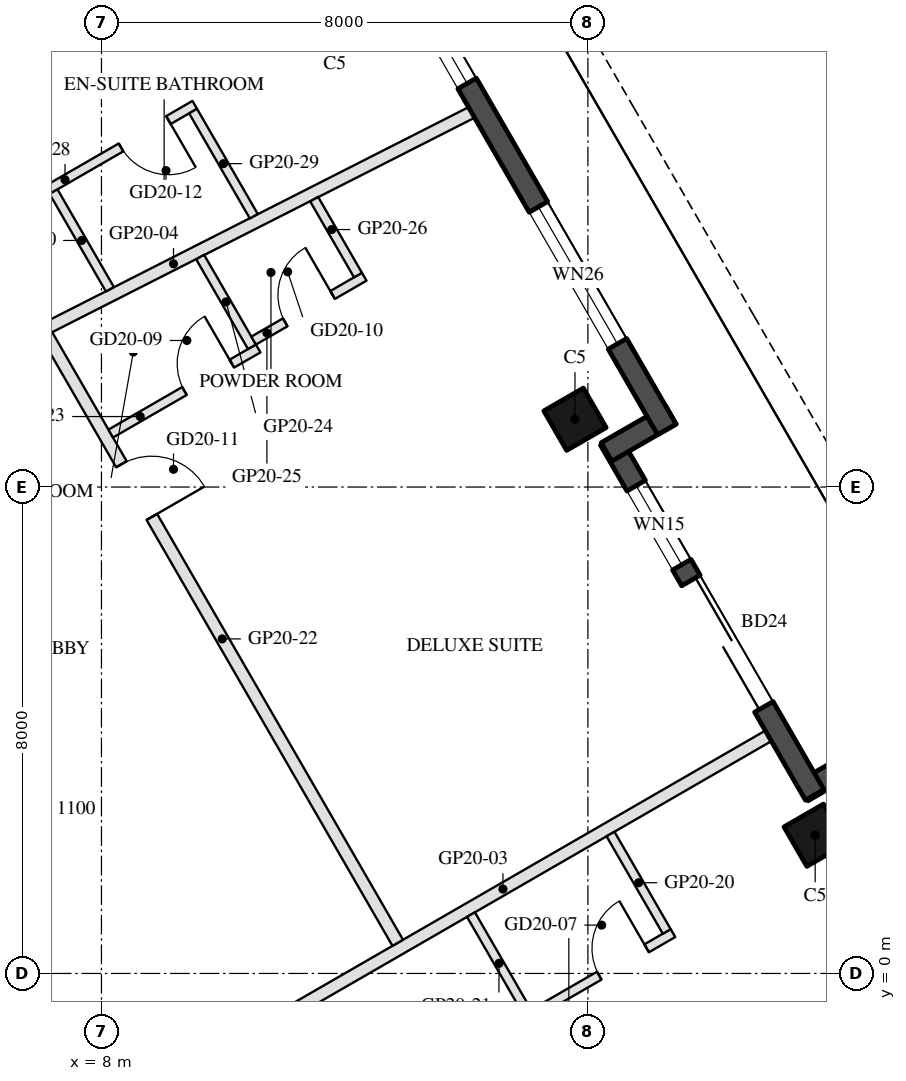
"""IFC4 building model, lengths in metres.
Left out: names, types, materials, properties, quantities, classifications, styles, units other than length and angle.
Written with IfcOpenShell. Run it as: python <this file> out.ifc"""

import sys

from ifc_helpers import new_model, si_unit, direction, frame, frame_2d, origin, origin_2d, place, context, subcontext, project, spatial, rectangle, hollow_rectangle, extrude, element, fill, save


model = new_model("IFC4")
c1 = context("Model", 3, precision=1e-05, world=origin(), true_north=direction((0.0, 1.0)))
c2 = subcontext(c1, "Body", "Model", "MODEL_VIEW")
j1 = project(units=[si_unit("LENGTHUNIT", "METRE"), si_unit("PLANEANGLEUNIT", "RADIAN")], contexts=[c1])
p1 = place(None, origin())
s1 = spatial("IfcSite", under=j1, at=p1, CompositionType="ELEMENT")
p2 = place(p1, origin())
s2 = spatial("IfcBuilding", under=s1, at=p2, CompositionType="ELEMENT")
p3 = place(p2, frame((0.0, 0.0, 213.2)))
s3 = spatial("IfcBuildingStorey", under=s2, at=p3, CompositionType="ELEMENT", Elevation=213.2)
for number, where, z_axis, x_axis in (
    (1, (19.738, 2.273, 0.0), (0.0, 0.0, 1.0), (-0.5, 0.866, 0.0)),
    (2, (15.788, 9.115, 0.0), (0.0, 0.0, 1.0), (-0.5, 0.866, 0.0)),
):
    element("IfcColumn", number, at=place(p3, frame(where, z_axis=z_axis, x_axis=x_axis)), inside=s3, PredefinedType="COLUMN", context=c2, shape_type="SweptSolid", body=[
        extrude(hollow_rectangle(XDim=0.75, YDim=0.75, WallThickness=0.035, at=origin_2d()), origin(), (0.0, 0.0, 1.0), 3.7),
    ])
p4 = place(p3, frame((20.588, 3.601, 0.0), z_axis=(0.0, 0.0, 1.0), x_axis=(-0.866005645448, -0.500034220881, 0.0)))
e3 = element("IfcWall", 3, at=p4, inside=s3, PredefinedType="SOLIDWALL", context=c2, shape_type="SweptSolid", body=[
    extrude(rectangle(XDim=1.22, YDim=0.35, at=frame_2d((0.61, 0.0))), origin(), (0.0, 0.0, 1.0), 3.55),
])
p5 = place(p3, frame((19.729, 2.938, 0.0), z_axis=(0.0, 0.0, 1.0), x_axis=(-0.499976430342, 0.866039011305, 0.0)))
e4 = element("IfcWall", 4, at=p5, inside=s3, PredefinedType="SOLIDWALL", context=c2, shape_type="SweptSolid", body=[
    extrude(rectangle(XDim=6.74, YDim=0.35, at=frame_2d((3.37, 0.0))), origin(), (0.0, 0.0, 1.0), 3.55),
])
p6 = place(p5, frame((1.67, 0.0, 0.0)))
e5 = element("IfcOpeningElement", 5, at=p6, cuts=e4, PredefinedType="OPENING", context=c2, shape_type="SweptSolid", body=[
    extrude(rectangle(XDim=2.4, YDim=2.4, at=frame_2d((1.2, 1.2))), frame((0.0, 0.185, 0.0), z_axis=(0.0, -1.0, 0.0), x_axis=(1.0, 0.0, 0.0)), (0.0, 0.0, 1.0), 0.37),
])
p7 = place(p5, frame((4.37, 0.0, 0.3)))
e6 = element("IfcOpeningElement", 6, at=p7, cuts=e4, PredefinedType="OPENING", context=c2, shape_type="SweptSolid", body=[
    extrude(rectangle(XDim=1.5, YDim=2.65, at=frame_2d((0.75, 1.325))), frame((0.0, 0.185, 0.0), z_axis=(0.0, -1.0, 0.0), x_axis=(1.0, 0.0, 0.0)), (0.0, 0.0, 1.0), 0.37),
])
p8 = place(p3, frame((16.306, 8.577, 0.0), z_axis=(0.0, 0.0, 1.0), x_axis=(0.866092288191, 0.499884134912, 0.0)))
e7 = element("IfcWall", 7, at=p8, inside=s3, PredefinedType="SOLIDWALL", context=c2, shape_type="SweptSolid", body=[
    extrude(rectangle(XDim=1.22, YDim=0.35, at=frame_2d((0.61, 0.0))), origin(), (0.0, 0.0, 1.0), 3.55),
])
p9 = place(p3, frame((17.299, 8.948, 0.0), z_axis=(0.0, 0.0, 1.0), x_axis=(-0.500010041276, 0.866019606374, 0.0)))
e8 = element("IfcWall", 8, at=p9, inside=s3, PredefinedType="SOLIDWALL", context=c2, shape_type="SweptSolid", body=[
    extrude(rectangle(XDim=9.7, YDim=0.35, at=frame_2d((4.85, 0.0))), origin(), (0.0, 0.0, 1.0), 3.55),
])
p10 = place(p9, frame((1.625, 0.0, 0.3)))
e9 = element("IfcOpeningElement", 9, at=p10, cuts=e8, PredefinedType="OPENING", context=c2, shape_type="SweptSolid", body=[
    extrude(rectangle(XDim=2.6, YDim=2.65, at=frame_2d((1.3, 1.325))), frame((0.0, 0.185, 0.0), z_axis=(0.0, -1.0, 0.0), x_axis=(1.0, 0.0, 0.0)), (0.0, 0.0, 1.0), 0.37),
])
p11 = place(p9, frame((6.57, 0.0, 0.3)))
e10 = element("IfcOpeningElement", 10, at=p11, cuts=e8, PredefinedType="OPENING", context=c2, shape_type="SweptSolid", body=[
    extrude(rectangle(XDim=1.5, YDim=2.65, at=frame_2d((0.75, 1.325))), frame((0.0, 0.185, 0.0), z_axis=(0.0, -1.0, 0.0), x_axis=(1.0, 0.0, 0.0)), (0.0, 0.0, 1.0), 0.37),
])
p12 = place(p3, frame((18.968, 3.907, 0.0), z_axis=(0.0, 0.0, 1.0), x_axis=(-0.866022637375, -0.500004791531, 0.0)))
e11 = element("IfcWall", 11, at=p12, inside=s3, PredefinedType="PARTITIONING", context=c2, shape_type="SweptSolid", body=[
    extrude(rectangle(XDim=10.08, YDim=0.2, at=frame_2d((5.04, 0.0))), origin(), (0.0, 0.0, 1.0), 3.06),
])
p13 = place(p3, frame((14.087, 14.161, 0.0), z_axis=(0.0, 0.0, 1.0), x_axis=(-0.891639053189, -0.452746947895, 0.0)))
e12 = element("IfcWall", 12, at=p13, inside=s3, PredefinedType="PARTITIONING", context=c2, shape_type="SweptSolid", body=[
    extrude(rectangle(XDim=10.996, YDim=0.2, at=frame_2d((5.498, 0.0))), origin(), (0.0, 0.0, 1.0), 3.06),
])
p14 = place(p3, frame((14.974, -0.737, 0.0), z_axis=(0.0, 0.0, 1.0), x_axis=(0.866018616679, 0.500011755427, 0.0)))
e13 = element("IfcWall", 13, at=p14, inside=s3, PredefinedType="PARTITIONING", context=c2, shape_type="SweptSolid", body=[
    extrude(rectangle(XDim=2.8, YDim=0.15, at=frame_2d((1.4, 0.0))), origin(), (0.0, 0.0, 1.0), 3.55),
])
p15 = place(p14, frame((1.4, 0.0, 0.0)))
e14 = element("IfcOpeningElement", 14, at=p15, cuts=e13, PredefinedType="OPENING", context=c2, shape_type="SweptSolid", body=[
    extrude(rectangle(XDim=0.9, YDim=2.1, at=frame_2d((0.45, 1.05))), frame((0.0, 0.085, 0.0), z_axis=(0.0, -1.0, 0.0), x_axis=(1.0, 0.0, 0.0)), (0.0, 0.0, 1.0), 0.17),
])
p16 = place(p3, frame((17.297, 0.691, 0.0), z_axis=(0.0, 0.0, 1.0), x_axis=(-0.499985172903, 0.866033964044, 0.0)))
e15 = element("IfcWall", 15, at=p16, inside=s3, PredefinedType="PARTITIONING", context=c2, shape_type="SweptSolid", body=[
    extrude(rectangle(XDim=1.85, YDim=0.15, at=frame_2d((0.925, 0.0))), origin(), (0.0, 0.0, 1.0), 2.95),
])
p17 = place(p3, frame((15.002, -0.634, 0.0), z_axis=(0.0, 0.0, 1.0), x_axis=(-0.500042316284, 0.866000971088, 0.0)))
e16 = element("IfcWall", 16, at=p17, inside=s3, PredefinedType="PARTITIONING", context=c2, shape_type="SweptSolid", body=[
    extrude(rectangle(XDim=1.85, YDim=0.15, at=frame_2d((0.925, 0.0))), origin(), (0.0, 0.0, 1.0), 2.95),
])
p18 = place(p3, frame((7.101, 10.501, 0.0), z_axis=(0.0, 0.0, 1.0), x_axis=(0.500001329633, -0.866024636119, 0.0)))
e17 = element("IfcWall", 17, at=p18, inside=s3, PredefinedType="PARTITIONING", context=c2, shape_type="SweptSolid", body=[
    extrude(rectangle(XDim=11.544, YDim=0.2, at=frame_2d((5.772, 0.0))), origin(), (0.0, 0.0, 1.0), 2.95),
])
p19 = place(p18, frame((2.455, 0.0, 0.0)))
e18 = element("IfcOpeningElement", 18, at=p19, cuts=e17, PredefinedType="OPENING", context=c2, shape_type="SweptSolid", body=[
    extrude(rectangle(XDim=1.0, YDim=2.1, at=frame_2d((0.5, 1.05))), frame((0.0, 0.11, 0.0), z_axis=(0.0, -1.0, 0.0), x_axis=(1.0, 0.0, 0.0)), (0.0, 0.0, 1.0), 0.22),
])
p20 = place(p3, frame((8.153, 8.879, 0.0), z_axis=(0.0, 0.0, 1.0), x_axis=(0.866034573852, 0.49998411664, 0.0)))
e19 = element("IfcWall", 19, at=p20, inside=s3, PredefinedType="PARTITIONING", context=c2, shape_type="SweptSolid", body=[
    extrude(rectangle(XDim=2.8, YDim=0.15, at=frame_2d((1.4, 0.0))), origin(), (0.0, 0.0, 1.0), 3.55),
])
p21 = place(p20, frame((1.4, 0.0, 0.0)))
e20 = element("IfcOpeningElement", 20, at=p21, cuts=e19, PredefinedType="OPENING", context=c2, shape_type="SweptSolid", body=[
    extrude(rectangle(XDim=0.9, YDim=2.1, at=frame_2d((0.45, 1.05))), frame((0.0, 0.085, 0.0), z_axis=(0.0, -1.0, 0.0), x_axis=(1.0, 0.0, 0.0)), (0.0, 0.0, 1.0), 0.17),
])
p22 = place(p3, frame((10.475, 10.307, 0.0), z_axis=(0.0, 0.0, 1.0), x_axis=(-0.500069835465, 0.865985080505, 0.0)))
e21 = element("IfcWall", 21, at=p22, inside=s3, PredefinedType="PARTITIONING", context=c2, shape_type="SweptSolid", body=[
    extrude(rectangle(XDim=1.703, YDim=0.15, at=frame_2d((0.852, 0.0))), origin(), (0.0, 0.0, 1.0), 2.95),
])
p23 = place(p3, frame((10.503, 10.409, 0.0), z_axis=(0.0, 0.0, 1.0), x_axis=(0.866009402589, 0.500027713859, 0.0)))
e22 = element("IfcWall", 22, at=p23, inside=s3, PredefinedType="PARTITIONING", context=c2, shape_type="SweptSolid", body=[
    extrude(rectangle(XDim=2.1, YDim=0.15, at=frame_2d((1.05, 0.0))), origin(), (0.0, 0.0, 1.0), 3.55),
])
p24 = place(p23, frame((0.6, 0.0, 0.0)))
e23 = element("IfcOpeningElement", 23, at=p24, cuts=e22, PredefinedType="OPENING", context=c2, shape_type="SweptSolid", body=[
    extrude(rectangle(XDim=0.9, YDim=2.1, at=frame_2d((0.45, 1.05))), frame((0.0, 0.085, 0.0), z_axis=(0.0, -1.0, 0.0), x_axis=(1.0, 0.0, 0.0)), (0.0, 0.0, 1.0), 0.17),
])
p25 = place(p3, frame((12.219, 11.486, 0.0), z_axis=(0.0, 0.0, 1.0), x_axis=(-0.500074377092, 0.865982457891, 0.0)))
e24 = element("IfcWall", 24, at=p25, inside=s3, PredefinedType="PARTITIONING", context=c2, shape_type="SweptSolid", body=[
    extrude(rectangle(XDim=1.441, YDim=0.15, at=frame_2d((0.721, 0.0))), origin(), (0.0, 0.0, 1.0), 2.95),
])
p26 = place(p3, frame((9.534, 14.286, 0.0), z_axis=(0.0, 0.0, 1.0), x_axis=(-0.866034573852, -0.49998411664, 0.0)))
e25 = element("IfcWall", 25, at=p26, inside=s3, PredefinedType="PARTITIONING", context=c2, shape_type="SweptSolid", body=[
    extrude(rectangle(XDim=2.8, YDim=0.15, at=frame_2d((1.4, 0.0))), origin(), (0.0, 0.0, 1.0), 3.55),
])
p27 = place(p26, frame((0.5, 0.0, 0.0)))
e26 = element("IfcOpeningElement", 26, at=p27, cuts=e25, PredefinedType="OPENING", context=c2, shape_type="SweptSolid", body=[
    extrude(rectangle(XDim=0.9, YDim=2.1, at=frame_2d((0.45, 1.05))), frame((0.0, 0.085, 0.0), z_axis=(0.0, -1.0, 0.0), x_axis=(1.0, 0.0, 0.0)), (0.0, 0.0, 1.0), 0.17),
])
p28 = place(p3, frame((10.505, 12.454, 0.0), z_axis=(0.0, 0.0, 1.0), x_axis=(-0.499965889992, 0.866045096311, 0.0)))
e27 = element("IfcWall", 27, at=p28, inside=s3, PredefinedType="PARTITIONING", context=c2, shape_type="SweptSolid", body=[
    extrude(rectangle(XDim=1.997, YDim=0.15, at=frame_2d((0.999, 0.0))), origin(), (0.0, 0.0, 1.0), 3.55),
])
p29 = place(p3, frame((8.139, 11.253, 0.0), z_axis=(0.0, 0.0, 1.0), x_axis=(-0.4999770169, 0.866038672677, 0.0)))
e28 = element("IfcWall", 28, at=p29, inside=s3, PredefinedType="PARTITIONING", context=c2, shape_type="SweptSolid", body=[
    extrude(rectangle(XDim=1.854, YDim=0.15, at=frame_2d((0.927, 0.0))), origin(), (0.0, 0.0, 1.0), 3.55),
])
p30 = place(p6, frame((2.4, 0.0, 0.0), z_axis=(0.0, 0.0, 1.0), x_axis=(-1.0, 0.0, 0.0)))
e29 = element("IfcDoor", 29, at=p30, inside=s3, OperationType="SLIDING_TO_LEFT", PredefinedType="DOOR", context=c2, shape_type="SweptSolid", body=[
    extrude(rectangle(XDim=2.4, YDim=2.4, at=frame_2d((1.2, 1.2))), frame((0.0, 0.025, 0.0), z_axis=(0.0, -1.0, 0.0), x_axis=(1.0, 0.0, 0.0)), (0.0, 0.0, 1.0), 0.05),
])
fill(e5, e29)
p31 = place(p7, origin())
e30 = element("IfcWindow", 30, at=p31, inside=s3, PartitioningType="SINGLE_PANEL", PredefinedType="WINDOW", context=c2, shape_type="SweptSolid", body=[
    extrude(rectangle(XDim=1.5, YDim=2.65, at=frame_2d((0.75, 1.325))), frame((0.0, 0.03, 0.0), z_axis=(0.0, -1.0, 0.0), x_axis=(1.0, 0.0, 0.0)), (0.0, 0.0, 1.0), 0.06),
])
fill(e6, e30)
p32 = place(p10, origin())
e31 = element("IfcWindow", 31, at=p32, inside=s3, PartitioningType="SINGLE_PANEL", PredefinedType="WINDOW", context=c2, shape_type="SweptSolid", body=[
    extrude(rectangle(XDim=2.6, YDim=2.65, at=frame_2d((1.3, 1.325))), frame((0.0, 0.03, 0.0), z_axis=(0.0, -1.0, 0.0), x_axis=(1.0, 0.0, 0.0)), (0.0, 0.0, 1.0), 0.06),
])
fill(e9, e31)
p33 = place(p11, origin())
e32 = element("IfcWindow", 32, at=p33, inside=s3, PartitioningType="SINGLE_PANEL", PredefinedType="WINDOW", context=c2, shape_type="SweptSolid", body=[
    extrude(rectangle(XDim=1.5, YDim=2.65, at=frame_2d((0.75, 1.325))), frame((0.0, 0.03, 0.0), z_axis=(0.0, -1.0, 0.0), x_axis=(1.0, 0.0, 0.0)), (0.0, 0.0, 1.0), 0.06),
])
fill(e10, e32)
p34 = place(p15, origin())
e33 = element("IfcDoor", 33, at=p34, inside=s3, OperationType="SINGLE_SWING_RIGHT", PredefinedType="DOOR", context=c2, shape_type="SweptSolid", body=[
    extrude(rectangle(XDim=0.9, YDim=2.1, at=frame_2d((0.45, 1.05))), frame((0.0, 0.025, 0.0), z_axis=(0.0, -1.0, 0.0), x_axis=(1.0, 0.0, 0.0)), (0.0, 0.0, 1.0), 0.05),
])
fill(e14, e33)
p35 = place(p21, origin())
e34 = element("IfcDoor", 34, at=p35, inside=s3, OperationType="SINGLE_SWING_RIGHT", PredefinedType="DOOR", context=c2, shape_type="SweptSolid", body=[
    extrude(rectangle(XDim=0.9, YDim=2.1, at=frame_2d((0.45, 1.05))), frame((0.0, 0.025, 0.0), z_axis=(0.0, -1.0, 0.0), x_axis=(1.0, 0.0, 0.0)), (0.0, 0.0, 1.0), 0.05),
])
fill(e20, e34)
p36 = place(p24, origin())
e35 = element("IfcDoor", 35, at=p36, inside=s3, OperationType="SINGLE_SWING_RIGHT", PredefinedType="DOOR", context=c2, shape_type="SweptSolid", body=[
    extrude(rectangle(XDim=0.9, YDim=2.1, at=frame_2d((0.45, 1.05))), frame((0.0, 0.025, 0.0), z_axis=(0.0, -1.0, 0.0), x_axis=(1.0, 0.0, 0.0)), (0.0, 0.0, 1.0), 0.05),
])
fill(e23, e35)
p37 = place(p19, origin())
e36 = element("IfcDoor", 36, at=p37, inside=s3, OperationType="SINGLE_SWING_RIGHT", PredefinedType="DOOR", context=c2, shape_type="SweptSolid", body=[
    extrude(rectangle(XDim=1.0, YDim=2.1, at=frame_2d((0.5, 1.05))), frame((0.0, 0.025, 0.0), z_axis=(0.0, -1.0, 0.0), x_axis=(1.0, 0.0, 0.0)), (0.0, 0.0, 1.0), 0.05),
])
fill(e18, e36)
p38 = place(p27, origin())
e37 = element("IfcDoor", 37, at=p38, inside=s3, OperationType="SINGLE_SWING_LEFT", PredefinedType="DOOR", context=c2, shape_type="SweptSolid", body=[
    extrude(rectangle(XDim=0.9, YDim=2.1, at=frame_2d((0.45, 1.05))), frame((0.0, 0.025, 0.0), z_axis=(0.0, -1.0, 0.0), x_axis=(1.0, 0.0, 0.0)), (0.0, 0.0, 1.0), 0.05),
])
fill(e26, e37)
save(model, sys.argv[1])
